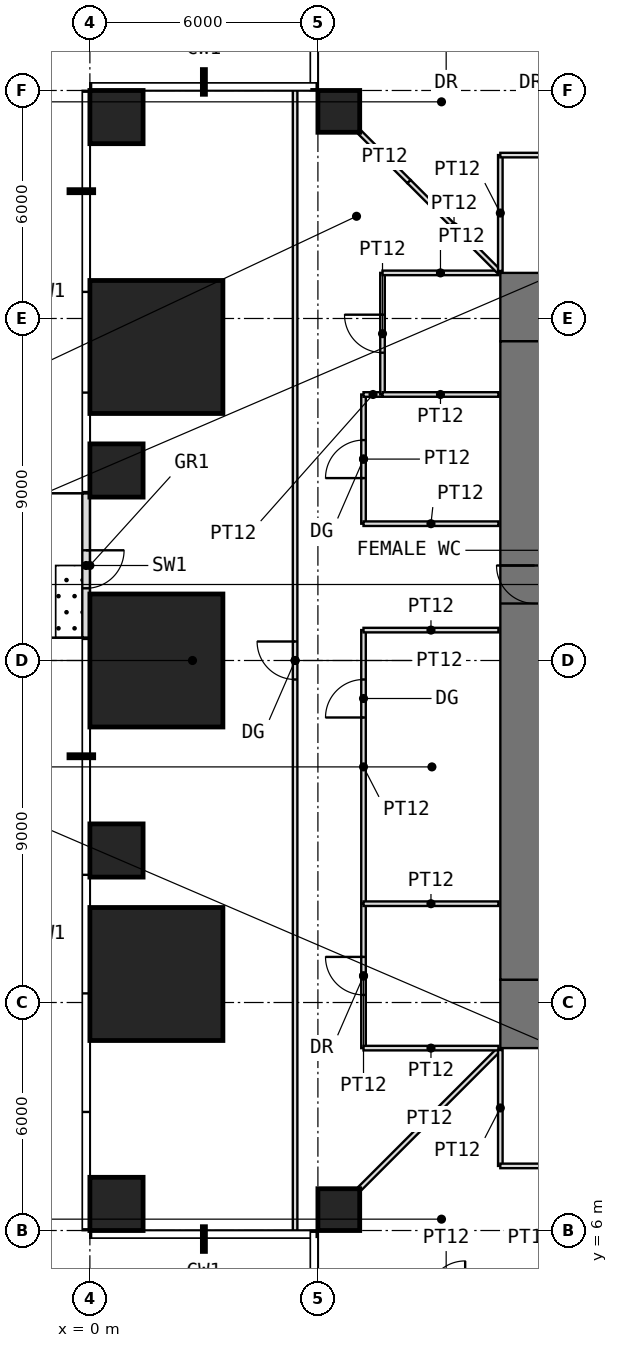
"""IFC4 building model, lengths in metres.
Left out: names, types, materials, properties, quantities, classifications, styles, units other than length and angle.
Written with IfcOpenShell. Run it as: python <this file> out.ifc"""

import sys

from ifc_helpers import new_model, si_unit, direction, frame, frame_2d, origin, origin_2d, place, context, subcontext, project, spatial, rectangle, extrude, element, fill, save


model = new_model("IFC4")
c1 = context("Model", 3, precision=1e-05, world=origin(), true_north=direction((0.0, 1.0)))
c2 = subcontext(c1, "Body", "Model", "MODEL_VIEW")
j1 = project(units=[si_unit("LENGTHUNIT", "METRE"), si_unit("PLANEANGLEUNIT", "RADIAN")], contexts=[c1])
p1 = place(None, origin())
s1 = spatial("IfcSite", under=j1, at=p1, CompositionType="ELEMENT")
p2 = place(p1, origin())
s2 = spatial("IfcBuilding", under=s1, at=p2, CompositionType="ELEMENT")
p3 = place(p2, frame((0.0, 0.0, 26.5)))
s3 = spatial("IfcBuildingStorey", under=s2, at=p3, CompositionType="ELEMENT", Elevation=26.5)
p4 = place(p3, frame((0.7, 6.7, 0.0), z_axis=(0.0, 0.0, 1.0), x_axis=(1.0, 0.0, 0.0)))
e1 = element("IfcColumn", 1, at=p4, inside=s3, PredefinedType="COLUMN", context=c2, shape_type="SweptSolid", body=[
    extrude(rectangle(XDim=1.4, YDim=1.4, at=origin_2d()), origin(), (0.0, 0.0, 1.0), 4.0),
])
p5 = place(p3, frame((6.55, 6.55, 0.0), z_axis=(0.0, 0.0, 1.0), x_axis=(1.0, 0.0, 0.0)))
e2 = element("IfcColumn", 2, at=p5, inside=s3, PredefinedType="COLUMN", context=c2, shape_type="SweptSolid", body=[
    extrude(rectangle(XDim=1.1, YDim=1.1, at=origin_2d()), origin(), (0.0, 0.0, 1.0), 4.0),
])
p6 = place(p3, frame((1.75, 12.75, 0.0), z_axis=(0.0, 0.0, 1.0), x_axis=(1.0, 0.0, 0.0)))
e3 = element("IfcColumn", 3, at=p6, inside=s3, PredefinedType="COLUMN", context=c2, shape_type="SweptSolid", body=[
    extrude(rectangle(XDim=3.5, YDim=3.5, at=origin_2d()), origin(), (0.0, 0.0, 1.0), 4.0),
])
p7 = place(p3, frame((0.7, 16.0, 0.0), z_axis=(0.0, 0.0, 1.0), x_axis=(1.0, 0.0, 0.0)))
e4 = element("IfcColumn", 4, at=p7, inside=s3, PredefinedType="COLUMN", context=c2, shape_type="SweptSolid", body=[
    extrude(rectangle(XDim=1.4, YDim=1.4, at=origin_2d()), origin(), (0.0, 0.0, 1.0), 4.0),
])
p8 = place(p3, frame((1.75, 21.0, 0.0), z_axis=(0.0, 0.0, 1.0), x_axis=(1.0, 0.0, 0.0)))
e5 = element("IfcColumn", 5, at=p8, inside=s3, PredefinedType="COLUMN", context=c2, shape_type="SweptSolid", body=[
    extrude(rectangle(XDim=3.5, YDim=3.5, at=origin_2d()), origin(), (0.0, 0.0, 1.0), 4.0),
])
p9 = place(p3, frame((0.7, 26.0, 0.0), z_axis=(0.0, 0.0, 1.0), x_axis=(1.0, 0.0, 0.0)))
e6 = element("IfcColumn", 6, at=p9, inside=s3, PredefinedType="COLUMN", context=c2, shape_type="SweptSolid", body=[
    extrude(rectangle(XDim=1.4, YDim=1.4, at=origin_2d()), origin(), (0.0, 0.0, 1.0), 4.0),
])
p10 = place(p3, frame((1.75, 29.25, 0.0), z_axis=(0.0, 0.0, 1.0), x_axis=(1.0, 0.0, 0.0)))
e7 = element("IfcColumn", 7, at=p10, inside=s3, PredefinedType="COLUMN", context=c2, shape_type="SweptSolid", body=[
    extrude(rectangle(XDim=3.5, YDim=3.5, at=origin_2d()), origin(), (0.0, 0.0, 1.0), 4.0),
])
p11 = place(p3, frame((0.7, 35.3, 0.0), z_axis=(0.0, 0.0, 1.0), x_axis=(1.0, 0.0, 0.0)))
e8 = element("IfcColumn", 8, at=p11, inside=s3, PredefinedType="COLUMN", context=c2, shape_type="SweptSolid", body=[
    extrude(rectangle(XDim=1.4, YDim=1.4, at=origin_2d()), origin(), (0.0, 0.0, 1.0), 4.0),
])
p12 = place(p3, frame((6.55, 35.45, 0.0), z_axis=(0.0, 0.0, 1.0), x_axis=(1.0, 0.0, 0.0)))
e9 = element("IfcColumn", 9, at=p12, inside=s3, PredefinedType="COLUMN", context=c2, shape_type="SweptSolid", body=[
    extrude(rectangle(XDim=1.1, YDim=1.1, at=origin_2d()), origin(), (0.0, 0.0, 1.0), 4.0),
])
p13 = place(p3, frame((-0.1, 25.4, 0.0), z_axis=(0.0, 0.0, 1.0), x_axis=(0.0, -1.0, 0.0)))
e10 = element("IfcWall", 10, at=p13, inside=s3, PredefinedType="USERDEFINED", context=c2, shape_type="SweptSolid", body=[
    extrude(rectangle(XDim=3.8, YDim=0.2, at=frame_2d((1.9, 0.0))), origin(), (0.0, 0.0, 1.0), 3.75),
])
p14 = place(p13, frame((1.5, 0.0, 0.0)))
e11 = element("IfcOpeningElement", 11, at=p14, cuts=e10, PredefinedType="OPENING", context=c2, shape_type="SweptSolid", body=[
    extrude(rectangle(XDim=1.0, YDim=2.4, at=frame_2d((0.5, 1.2))), frame((0.0, 0.11, 0.0), z_axis=(0.0, -1.0, 0.0), x_axis=(1.0, 0.0, 0.0)), (0.0, 0.0, 1.0), 0.22),
])
p15 = place(p3, frame((10.8, 11.7, -0.05), z_axis=(0.0, 0.0, 1.0), x_axis=(1.0, 0.0, 0.0)))
e12 = element("IfcWall", 12, at=p15, inside=s3, PredefinedType="SHEAR", context=c2, shape_type="SweptSolid", body=[
    extrude(rectangle(XDim=20.4, YDim=1.8, at=frame_2d((10.2, 0.0))), origin(), (0.0, 0.0, 1.0), 4.0),
])
p16 = place(p15, frame((9.2, 0.0, 0.05)))
e13 = element("IfcOpeningElement", 13, at=p16, cuts=e12, PredefinedType="OPENING", context=c2, shape_type="SweptSolid", body=[
    extrude(rectangle(XDim=2.0, YDim=2.2, at=frame_2d((1.0, 1.1))), frame((0.0, 0.91, 0.0), z_axis=(0.0, -1.0, 0.0), x_axis=(1.0, 0.0, 0.0)), (0.0, 0.0, 1.0), 1.82),
])
p17 = place(p3, frame((10.8, 30.3, -0.05), z_axis=(0.0, 0.0, 1.0), x_axis=(1.0, 0.0, 0.0)))
e14 = element("IfcWall", 14, at=p17, inside=s3, PredefinedType="SHEAR", context=c2, shape_type="SweptSolid", body=[
    extrude(rectangle(XDim=20.4, YDim=1.8, at=frame_2d((10.2, 0.0))), origin(), (0.0, 0.0, 1.0), 4.0),
])
p18 = place(p17, frame((9.2, 0.0, 0.05)))
e15 = element("IfcOpeningElement", 15, at=p18, cuts=e14, PredefinedType="OPENING", context=c2, shape_type="SweptSolid", body=[
    extrude(rectangle(XDim=2.0, YDim=2.2, at=frame_2d((1.0, 1.1))), frame((0.0, 0.91, 0.0), z_axis=(0.0, -1.0, 0.0), x_axis=(1.0, 0.0, 0.0)), (0.0, 0.0, 1.0), 1.82),
])
p19 = place(p3, frame((11.7, 12.6, -0.05), z_axis=(0.0, 0.0, 1.0), x_axis=(0.0, 1.0, 0.0)))
e16 = element("IfcWall", 16, at=p19, inside=s3, PredefinedType="SHEAR", context=c2, shape_type="SweptSolid", body=[
    extrude(rectangle(XDim=16.8, YDim=1.8, at=frame_2d((8.4, 0.0))), origin(), (0.0, 0.0, 1.0), 4.0),
])
p20 = place(p19, frame((9.9, 0.0, 0.05)))
e17 = element("IfcOpeningElement", 17, at=p20, cuts=e16, PredefinedType="OPENING", context=c2, shape_type="SweptSolid", body=[
    extrude(rectangle(XDim=1.0, YDim=2.2, at=frame_2d((0.5, 1.1))), frame((0.0, 0.91, 0.0), z_axis=(0.0, -1.0, 0.0), x_axis=(1.0, 0.0, 0.0)), (0.0, 0.0, 1.0), 1.82),
])
p21 = place(p3, frame((5.4, 6.0, 0.0), z_axis=(0.0, 0.0, 1.0), x_axis=(0.0, 1.0, 0.0)))
e18 = element("IfcWall", 18, at=p21, inside=s3, PredefinedType="PARTITIONING", context=c2, shape_type="SweptSolid", body=[
    extrude(rectangle(XDim=30.0, YDim=0.12, at=frame_2d((15.0, 0.0))), origin(), (0.0, 0.0, 1.0), 3.75),
])
p22 = place(p21, frame((14.5, 0.0, 0.0)))
e19 = element("IfcOpeningElement", 19, at=p22, cuts=e18, PredefinedType="OPENING", context=c2, shape_type="SweptSolid", body=[
    extrude(rectangle(XDim=1.0, YDim=2.4, at=frame_2d((0.5, 1.2))), frame((0.0, 0.07, 0.0), z_axis=(0.0, -1.0, 0.0), x_axis=(1.0, 0.0, 0.0)), (0.0, 0.0, 1.0), 0.14),
])
p23 = place(p3, frame((7.11, 7.11, 0.0), z_axis=(0.0, 0.0, 1.0), x_axis=(0.707106781187, 0.707106781187, 0.0)))
e20 = element("IfcWall", 20, at=p23, inside=s3, PredefinedType="PARTITIONING", context=c2, shape_type="SweptSolid", body=[
    extrude(rectangle(XDim=5.168, YDim=0.12, at=frame_2d((2.584, 0.0))), origin(), (0.0, 0.0, 1.0), 3.75),
])
p24 = place(p3, frame((7.11, 34.89, 0.0), z_axis=(0.0, 0.0, 1.0), x_axis=(0.707106781187, -0.707106781187, 0.0)))
e21 = element("IfcWall", 21, at=p24, inside=s3, PredefinedType="PARTITIONING", context=c2, shape_type="SweptSolid", body=[
    extrude(rectangle(XDim=1.822, YDim=0.12, at=frame_2d((0.911, 0.0))), origin(), (0.0, 0.0, 1.0), 3.75),
])
p25 = place(p3, frame((7.2, 10.8, 0.0), z_axis=(0.0, 0.0, 1.0), x_axis=(0.0, 1.0, 0.0)))
e22 = element("IfcWall", 22, at=p25, inside=s3, PredefinedType="PARTITIONING", context=c2, shape_type="SweptSolid", body=[
    extrude(rectangle(XDim=3.8, YDim=0.12, at=frame_2d((1.9, 0.0))), origin(), (0.0, 0.0, 1.0), 3.75),
])
p26 = place(p25, frame((1.4, 0.0, 0.0)))
e23 = element("IfcOpeningElement", 23, at=p26, cuts=e22, PredefinedType="OPENING", context=c2, shape_type="SweptSolid", body=[
    extrude(rectangle(XDim=1.0, YDim=2.2, at=frame_2d((0.5, 1.1))), frame((0.0, 0.07, 0.0), z_axis=(0.0, -1.0, 0.0), x_axis=(1.0, 0.0, 0.0)), (0.0, 0.0, 1.0), 0.14),
])
p27 = place(p3, frame((7.2, 10.8, 0.0), z_axis=(0.0, 0.0, 1.0), x_axis=(1.0, 0.0, 0.0)))
e24 = element("IfcWall", 24, at=p27, inside=s3, PredefinedType="PARTITIONING", context=c2, shape_type="SweptSolid", body=[
    extrude(rectangle(XDim=3.55, YDim=0.12, at=frame_2d((1.775, 0.0))), origin(), (0.0, 0.0, 1.0), 3.75),
])
p28 = place(p3, frame((7.2, 14.6, 0.0), z_axis=(0.0, 0.0, 1.0), x_axis=(0.0, 1.0, 0.0)))
e25 = element("IfcWall", 25, at=p28, inside=s3, PredefinedType="PARTITIONING", context=c2, shape_type="SweptSolid", body=[
    extrude(rectangle(XDim=7.2, YDim=0.12, at=frame_2d((3.6, 0.0))), origin(), (0.0, 0.0, 1.0), 3.75),
])
p29 = place(p28, frame((4.9, 0.0, 0.0)))
e26 = element("IfcOpeningElement", 26, at=p29, cuts=e25, PredefinedType="OPENING", context=c2, shape_type="SweptSolid", body=[
    extrude(rectangle(XDim=1.0, YDim=2.4, at=frame_2d((0.5, 1.2))), frame((0.0, 0.07, 0.0), z_axis=(0.0, -1.0, 0.0), x_axis=(1.0, 0.0, 0.0)), (0.0, 0.0, 1.0), 0.14),
])
for number, where, z_axis, x_axis in (
    (27, (7.2, 14.6, 0.0), (0.0, 0.0, 1.0), (1.0, 0.0, 0.0)),
    (28, (7.2, 21.8, 0.0), (0.0, 0.0, 1.0), (1.0, 0.0, 0.0)),
):
    element("IfcWall", number, at=place(p3, frame(where, z_axis=z_axis, x_axis=x_axis)), inside=s3, PredefinedType="PARTITIONING", context=c2, shape_type="SweptSolid", body=[
        extrude(rectangle(XDim=3.55, YDim=0.12, at=frame_2d((1.775, 0.0))), origin(), (0.0, 0.0, 1.0), 3.75),
    ])
p30 = place(p3, frame((7.2, 24.6, 0.0), z_axis=(0.0, 0.0, 1.0), x_axis=(0.0, 1.0, 0.0)))
e29 = element("IfcWall", 29, at=p30, inside=s3, PredefinedType="PARTITIONING", context=c2, shape_type="SweptSolid", body=[
    extrude(rectangle(XDim=3.4, YDim=0.12, at=frame_2d((1.7, 0.0))), origin(), (0.0, 0.0, 1.0), 3.75),
])
p31 = place(p30, frame((1.2, 0.0, 0.0)))
e30 = element("IfcOpeningElement", 30, at=p31, cuts=e29, PredefinedType="OPENING", context=c2, shape_type="SweptSolid", body=[
    extrude(rectangle(XDim=1.0, YDim=2.4, at=frame_2d((0.5, 1.2))), frame((0.0, 0.07, 0.0), z_axis=(0.0, -1.0, 0.0), x_axis=(1.0, 0.0, 0.0)), (0.0, 0.0, 1.0), 0.14),
])
p32 = place(p3, frame((7.2, 24.6, 0.0), z_axis=(0.0, 0.0, 1.0), x_axis=(1.0, 0.0, 0.0)))
e31 = element("IfcWall", 31, at=p32, inside=s3, PredefinedType="PARTITIONING", context=c2, shape_type="SweptSolid", body=[
    extrude(rectangle(XDim=3.55, YDim=0.12, at=frame_2d((1.775, 0.0))), origin(), (0.0, 0.0, 1.0), 3.75),
])
p33 = place(p3, frame((7.2, 28.0, 0.0), z_axis=(0.0, 0.0, 1.0), x_axis=(1.0, 0.0, 0.0)))
e32 = element("IfcWall", 32, at=p33, inside=s3, PredefinedType="PARTITIONING", context=c2, shape_type="SweptSolid", body=[
    extrude(rectangle(XDim=0.5, YDim=0.12, at=frame_2d((0.25, 0.0))), origin(), (0.0, 0.0, 1.0), 3.75),
])
p34 = place(p3, frame((7.7, 28.0, 0.0), z_axis=(0.0, 0.0, 1.0), x_axis=(0.0, 1.0, 0.0)))
e33 = element("IfcWall", 33, at=p34, inside=s3, PredefinedType="PARTITIONING", context=c2, shape_type="SweptSolid", body=[
    extrude(rectangle(XDim=3.2, YDim=0.12, at=frame_2d((1.6, 0.0))), origin(), (0.0, 0.0, 1.0), 3.75),
])
p35 = place(p34, frame((1.1, 0.0, 0.0)))
e34 = element("IfcOpeningElement", 34, at=p35, cuts=e33, PredefinedType="OPENING", context=c2, shape_type="SweptSolid", body=[
    extrude(rectangle(XDim=1.0, YDim=2.2, at=frame_2d((0.5, 1.1))), frame((0.0, 0.07, 0.0), z_axis=(0.0, -1.0, 0.0), x_axis=(1.0, 0.0, 0.0)), (0.0, 0.0, 1.0), 0.14),
])
for number, where, z_axis, x_axis in (
    (35, (7.7, 28.0, 0.0), (0.0, 0.0, 1.0), (1.0, 0.0, 0.0)),
    (36, (7.7, 31.2, 0.0), (0.0, 0.0, 1.0), (1.0, 0.0, 0.0)),
):
    element("IfcWall", number, at=place(p3, frame(where, z_axis=z_axis, x_axis=x_axis)), inside=s3, PredefinedType="PARTITIONING", context=c2, shape_type="SweptSolid", body=[
        extrude(rectangle(XDim=3.05, YDim=0.12, at=frame_2d((1.525, 0.0))), origin(), (0.0, 0.0, 1.0), 3.75),
    ])
p36 = place(p3, frame((8.398, 33.602, 0.0), z_axis=(0.0, 0.0, 1.0), x_axis=(0.707106781187, -0.707106781187, 0.0)))
e37 = element("IfcWall", 37, at=p36, inside=s3, PredefinedType="PARTITIONING", context=c2, shape_type="SweptSolid", body=[
    extrude(rectangle(XDim=3.346, YDim=0.12, at=frame_2d((1.673, 0.0))), origin(), (0.0, 0.0, 1.0), 3.75),
])
p37 = place(p3, frame((10.8, 7.7, 0.0), z_axis=(0.0, 0.0, 1.0), x_axis=(0.0, 1.0, 0.0)))
e38 = element("IfcWall", 38, at=p37, inside=s3, PredefinedType="PARTITIONING", context=c2, shape_type="SweptSolid", body=[
    extrude(rectangle(XDim=3.05, YDim=0.12, at=frame_2d((1.525, 0.0))), origin(), (0.0, 0.0, 1.0), 3.75),
])
p38 = place(p3, frame((10.8, 7.7, 0.0), z_axis=(0.0, 0.0, 1.0), x_axis=(1.0, 0.0, 0.0)))
e39 = element("IfcWall", 39, at=p38, inside=s3, PredefinedType="PARTITIONING", context=c2, shape_type="SweptSolid", body=[
    extrude(rectangle(XDim=3.8, YDim=0.12, at=frame_2d((1.9, 0.0))), origin(), (0.0, 0.0, 1.0), 3.75),
])
p39 = place(p38, frame((1.4, 0.0, 0.0)))
e40 = element("IfcOpeningElement", 40, at=p39, cuts=e39, PredefinedType="OPENING", context=c2, shape_type="SweptSolid", body=[
    extrude(rectangle(XDim=1.0, YDim=2.2, at=frame_2d((0.5, 1.1))), frame((0.0, 0.07, 0.0), z_axis=(0.0, -1.0, 0.0), x_axis=(1.0, 0.0, 0.0)), (0.0, 0.0, 1.0), 0.14),
])
p40 = place(p3, frame((10.8, 31.25, 0.0), z_axis=(0.0, 0.0, 1.0), x_axis=(0.0, 1.0, 0.0)))
e41 = element("IfcWall", 41, at=p40, inside=s3, PredefinedType="PARTITIONING", context=c2, shape_type="SweptSolid", body=[
    extrude(rectangle(XDim=3.05, YDim=0.12, at=frame_2d((1.525, 0.0))), origin(), (0.0, 0.0, 1.0), 3.75),
])
p41 = place(p3, frame((10.8, 34.3, 0.0), z_axis=(0.0, 0.0, 1.0), x_axis=(1.0, 0.0, 0.0)))
e42 = element("IfcWall", 42, at=p41, inside=s3, PredefinedType="PARTITIONING", context=c2, shape_type="SweptSolid", body=[
    extrude(rectangle(XDim=3.8, YDim=0.12, at=frame_2d((1.9, 0.0))), origin(), (0.0, 0.0, 1.0), 3.75),
])
p42 = place(p41, frame((1.4, 0.0, 0.0)))
e43 = element("IfcOpeningElement", 43, at=p42, cuts=e42, PredefinedType="OPENING", context=c2, shape_type="SweptSolid", body=[
    extrude(rectangle(XDim=1.0, YDim=2.2, at=frame_2d((0.5, 1.1))), frame((0.0, 0.07, 0.0), z_axis=(0.0, -1.0, 0.0), x_axis=(1.0, 0.0, 0.0)), (0.0, 0.0, 1.0), 0.14),
])
p43 = place(p14, origin())
e44 = element("IfcDoor", 44, at=p43, inside=s3, OperationType="SINGLE_SWING_LEFT", PredefinedType="DOOR", context=c2, shape_type="SweptSolid", body=[
    extrude(rectangle(XDim=1.0, YDim=2.4, at=frame_2d((0.5, 1.2))), frame((0.0, 0.025, 0.0), z_axis=(0.0, -1.0, 0.0), x_axis=(1.0, 0.0, 0.0)), (0.0, 0.0, 1.0), 0.05),
])
fill(e11, e44)
p44 = place(p20, origin())
e45 = element("IfcDoor", 45, at=p44, inside=s3, OperationType="SINGLE_SWING_RIGHT", PredefinedType="DOOR", context=c2, shape_type="SweptSolid", body=[
    extrude(rectangle(XDim=1.0, YDim=2.2, at=frame_2d((0.5, 1.1))), frame((0.0, 0.025, 0.0), z_axis=(0.0, -1.0, 0.0), x_axis=(1.0, 0.0, 0.0)), (0.0, 0.0, 1.0), 0.05),
])
fill(e17, e45)
p45 = place(p26, origin())
e46 = element("IfcDoor", 46, at=p45, inside=s3, OperationType="SINGLE_SWING_RIGHT", PredefinedType="DOOR", context=c2, shape_type="SweptSolid", body=[
    extrude(rectangle(XDim=1.0, YDim=2.2, at=frame_2d((0.5, 1.1))), frame((0.0, 0.025, 0.0), z_axis=(0.0, -1.0, 0.0), x_axis=(1.0, 0.0, 0.0)), (0.0, 0.0, 1.0), 0.05),
])
fill(e23, e46)
p46 = place(p31, origin())
e47 = element("IfcDoor", 47, at=p46, inside=s3, OperationType="SINGLE_SWING_LEFT", PredefinedType="DOOR", context=c2, shape_type="SweptSolid", body=[
    extrude(rectangle(XDim=1.0, YDim=2.4, at=frame_2d((0.5, 1.2))), frame((0.0, 0.025, 0.0), z_axis=(0.0, -1.0, 0.0), x_axis=(1.0, 0.0, 0.0)), (0.0, 0.0, 1.0), 0.05),
])
fill(e30, e47)
p47 = place(p35, origin())
e48 = element("IfcDoor", 48, at=p47, inside=s3, OperationType="SINGLE_SWING_RIGHT", PredefinedType="DOOR", context=c2, shape_type="SweptSolid", body=[
    extrude(rectangle(XDim=1.0, YDim=2.2, at=frame_2d((0.5, 1.1))), frame((0.0, 0.025, 0.0), z_axis=(0.0, -1.0, 0.0), x_axis=(1.0, 0.0, 0.0)), (0.0, 0.0, 1.0), 0.05),
])
fill(e34, e48)
p48 = place(p22, origin())
e49 = element("IfcDoor", 49, at=p48, inside=s3, OperationType="SINGLE_SWING_RIGHT", PredefinedType="DOOR", context=c2, shape_type="SweptSolid", body=[
    extrude(rectangle(XDim=1.0, YDim=2.4, at=frame_2d((0.5, 1.2))), frame((0.0, 0.025, 0.0), z_axis=(0.0, -1.0, 0.0), x_axis=(1.0, 0.0, 0.0)), (0.0, 0.0, 1.0), 0.05),
])
fill(e19, e49)
p49 = place(p29, origin())
e50 = element("IfcDoor", 50, at=p49, inside=s3, OperationType="SINGLE_SWING_LEFT", PredefinedType="DOOR", context=c2, shape_type="SweptSolid", body=[
    extrude(rectangle(XDim=1.0, YDim=2.4, at=frame_2d((0.5, 1.2))), frame((0.0, 0.025, 0.0), z_axis=(0.0, -1.0, 0.0), x_axis=(1.0, 0.0, 0.0)), (0.0, 0.0, 1.0), 0.05),
])
fill(e26, e50)
save(model, sys.argv[1])
